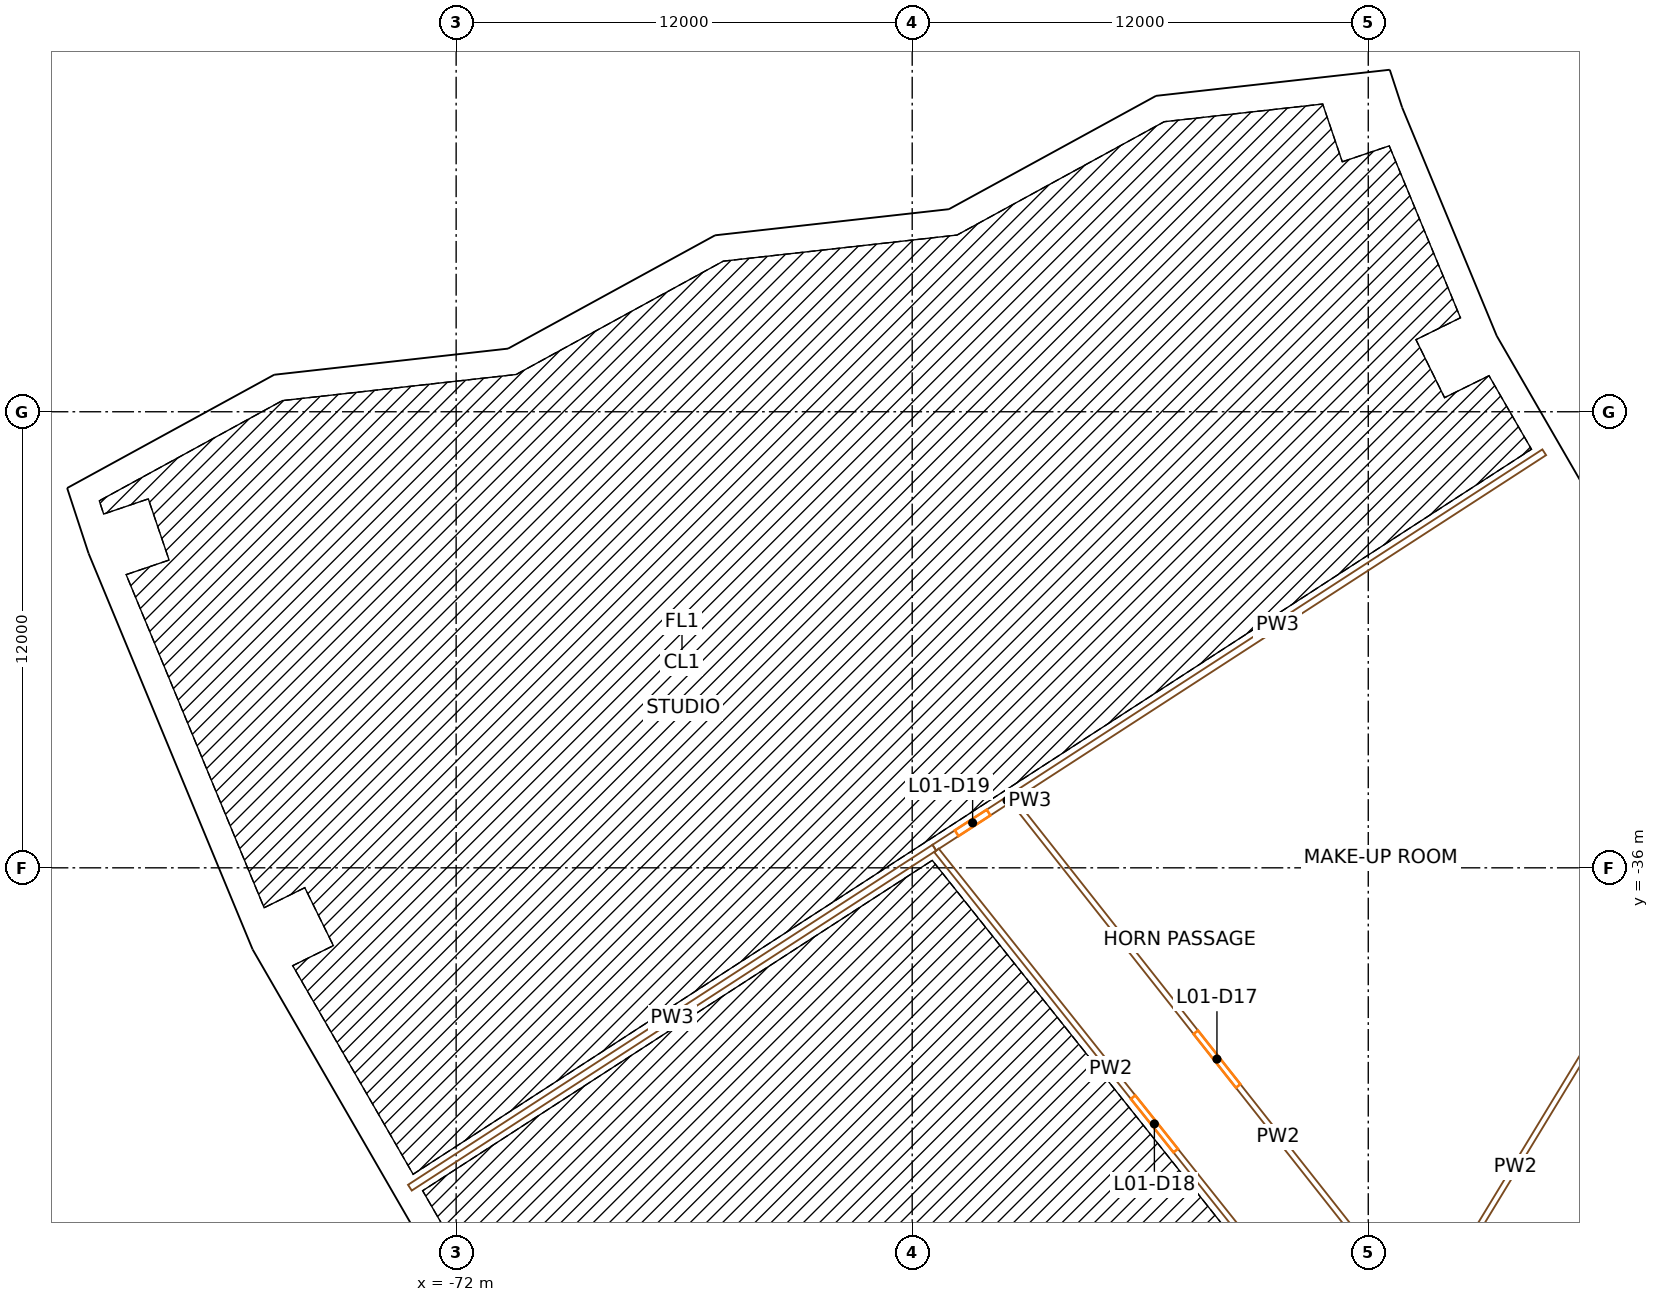
"""IFC4 building model, lengths in metres.
Left out: names, types, materials, properties, quantities, classifications, styles, units other than length and angle.
Written with IfcOpenShell. Run it as: python <this file> out.ifc"""

import sys

from ifc_helpers import new_model, si_unit, direction, frame, frame_2d, origin, origin_2d, place, context, subcontext, project, spatial, rectangle, extrude, element, fill, save


model = new_model("IFC4")
c1 = context("Model", 3, precision=1e-05, world=origin(), true_north=direction((0.0, 1.0)))
c2 = subcontext(c1, "Body", "Model", "MODEL_VIEW")
j1 = project(units=[si_unit("LENGTHUNIT", "METRE"), si_unit("PLANEANGLEUNIT", "RADIAN")], contexts=[c1])
p1 = place(None, origin())
s1 = spatial("IfcSite", under=j1, at=p1, CompositionType="ELEMENT")
p2 = place(p1, origin())
s2 = spatial("IfcBuilding", under=s1, at=p2, CompositionType="ELEMENT")
p3 = place(p2, frame((0.0, 0.0, 9.0)))
s3 = spatial("IfcBuildingStorey", under=s2, at=p3, CompositionType="ELEMENT", Elevation=9.0)
p4 = place(p3, frame((-48.057, -16.313, 0.0), z_axis=(0.0, 0.0, 1.0), x_axis=(0.321439465303, -0.946930129495, 0.0)))
e1 = element("IfcColumn", 1, at=p4, inside=s3, PredefinedType="COLUMN", context=c2, shape_type="SweptSolid", body=[
    extrude(rectangle(XDim=1.1, YDim=1.3, at=origin_2d()), origin(), (0.0, 0.0, 1.0), 9.0),
])
for number, where, z_axis, x_axis in (
    (2, (-55.159, -18.724, 0.0), (0.0, 0.0, 1.0), (0.321, -0.947, 0.0)),
    (3, (-73.624, -24.992, 0.0), (0.0, 0.0, 1.0), (0.321, -0.947, 0.0)),
):
    element("IfcColumn", number, at=place(p3, frame(where, z_axis=z_axis, x_axis=x_axis)), inside=s3, PredefinedType="COLUMN", context=c2, shape_type="SweptSolid", body=[
        extrude(rectangle(XDim=1.4, YDim=1.8, at=origin_2d()), origin(), (0.0, 0.0, 1.0), 9.0),
    ])
for number, where, z_axis, x_axis in (
    (4, (-80.726, -27.403, 0.0), (0.0, 0.0, 1.0), (0.321, -0.947, 0.0)),
    (5, (-45.516, -22.446, 0.0), (0.0, 0.0, 1.0), (0.442, -0.897, 0.0)),
):
    element("IfcColumn", number, at=place(p3, frame(where, z_axis=z_axis, x_axis=x_axis)), inside=s3, PredefinedType="COLUMN", context=c2, shape_type="SweptSolid", body=[
        extrude(rectangle(XDim=1.1, YDim=1.3, at=origin_2d()), origin(), (0.0, 0.0, 1.0), 9.0),
    ])
for number, where, z_axis, x_axis in (
    (6, (-52.243, -25.763, 0.0), (0.0, 0.0, 1.0), (0.442, -0.897, 0.0)),
    (7, (-69.732, -34.388, 0.0), (0.0, 0.0, 1.0), (0.442, -0.897, 0.0)),
):
    element("IfcColumn", number, at=place(p3, frame(where, z_axis=z_axis, x_axis=x_axis)), inside=s3, PredefinedType="COLUMN", context=c2, shape_type="SweptSolid", body=[
        extrude(rectangle(XDim=1.4, YDim=1.8, at=origin_2d()), origin(), (0.0, 0.0, 1.0), 9.0),
    ])
for number, where, z_axis, x_axis in (
    (8, (-76.458, -37.705, 0.0), (0.0, 0.0, 1.0), (0.442, -0.897, 0.0)),
    (9, (-42.197, -28.195, 0.0), (0.0, 0.0, 1.0), (0.556, -0.831, 0.0)),
):
    element("IfcColumn", number, at=place(p3, frame(where, z_axis=z_axis, x_axis=x_axis)), inside=s3, PredefinedType="COLUMN", context=c2, shape_type="SweptSolid", body=[
        extrude(rectangle(XDim=1.1, YDim=1.3, at=origin_2d()), origin(), (0.0, 0.0, 1.0), 9.0),
    ])
for number, where, z_axis, x_axis in (
    (10, (-48.433, -32.362, 0.0), (0.0, 0.0, 1.0), (0.556, -0.831, 0.0)),
    (11, (-64.647, -43.196, 0.0), (0.0, 0.0, 1.0), (0.556, -0.831, 0.0)),
    (12, (-43.795, -38.407, 0.0), (0.0, 0.0, 1.0), (0.659, -0.752, 0.0)),
):
    element("IfcColumn", number, at=place(p3, frame(where, z_axis=z_axis, x_axis=x_axis)), inside=s3, PredefinedType="COLUMN", context=c2, shape_type="SweptSolid", body=[
        extrude(rectangle(XDim=1.4, YDim=1.8, at=origin_2d()), origin(), (0.0, 0.0, 1.0), 9.0),
    ])
p5 = place(p3, frame((-49.779, -57.191, 0.0), z_axis=(0.0, 0.0, 1.0), x_axis=(0.573577477574, 0.819151315216, 0.0)))
e13 = element("IfcWall", 13, at=p5, inside=s3, PredefinedType="SHEAR", context=c2, shape_type="SweptSolid", body=[
    extrude(rectangle(XDim=14.8, YDim=0.9, at=frame_2d((7.4, 0.0))), origin(), (0.0, 0.0, 1.0), 8.6),
])
p6 = place(p5, frame((6.7, 0.0, 0.0)))
e14 = element("IfcOpeningElement", 14, at=p6, cuts=e13, PredefinedType="OPENING", context=c2, shape_type="SweptSolid", body=[
    extrude(rectangle(XDim=1.4, YDim=2.1, at=frame_2d((0.7, 1.05))), frame((0.0, 0.46, 0.0), z_axis=(0.0, -1.0, 0.0), x_axis=(1.0, 0.0, 0.0)), (0.0, 0.0, 1.0), 0.92),
])
p7 = place(p3, frame((-47.373, -15.221, 0.0), z_axis=(0.0, 0.0, 1.0), x_axis=(-0.993827533543, -0.110936168908, 0.0)))
e15 = element("IfcWall", 15, at=p7, inside=s3, PredefinedType="SOLIDWALL", context=c2, shape_type="SweptSolid", body=[
    extrude(rectangle(XDim=6.265, YDim=0.45, at=frame_2d((3.133, 0.0))), origin(), (0.0, 0.0, 1.0), 7.7),
])
p8 = place(p3, frame((-53.659, -15.985, 0.0), z_axis=(0.0, 0.0, 1.0), x_axis=(-0.87728135657, -0.479976480064, 0.0)))
e16 = element("IfcWall", 16, at=p8, inside=s3, PredefinedType="SOLIDWALL", context=c2, shape_type="SweptSolid", body=[
    extrude(rectangle(XDim=5.885, YDim=0.45, at=frame_2d((2.943, 0.0))), origin(), (0.0, 0.0, 1.0), 7.7),
])
p9 = place(p3, frame((-58.881, -18.879, 0.0), z_axis=(0.0, 0.0, 1.0), x_axis=(-0.993818963433, -0.111012917816, 0.0)))
e17 = element("IfcWall", 17, at=p9, inside=s3, PredefinedType="SOLIDWALL", context=c2, shape_type="SweptSolid", body=[
    extrude(rectangle(XDim=6.36, YDim=0.45, at=frame_2d((3.18, 0.0))), origin(), (0.0, 0.0, 1.0), 7.7),
])
p10 = place(p3, frame((-65.261, -19.655, 0.0), z_axis=(0.0, 0.0, 1.0), x_axis=(-0.877230259454, -0.480069861477, 0.0)))
e18 = element("IfcWall", 18, at=p10, inside=s3, PredefinedType="SOLIDWALL", context=c2, shape_type="SweptSolid", body=[
    extrude(rectangle(XDim=5.884, YDim=0.45, at=frame_2d((2.942, 0.0))), origin(), (0.0, 0.0, 1.0), 7.7),
])
p11 = place(p3, frame((-70.481, -22.548, 0.0), z_axis=(0.0, 0.0, 1.0), x_axis=(-0.993813805196, -0.111059086081, 0.0)))
e19 = element("IfcWall", 19, at=p11, inside=s3, PredefinedType="SOLIDWALL", context=c2, shape_type="SweptSolid", body=[
    extrude(rectangle(XDim=6.362, YDim=0.45, at=frame_2d((3.181, 0.0))), origin(), (0.0, 0.0, 1.0), 7.7),
])
p12 = place(p3, frame((-76.863, -23.324, 0.0), z_axis=(0.0, 0.0, 1.0), x_axis=(-0.877209140108, -0.480108450781, 0.0)))
e20 = element("IfcWall", 20, at=p12, inside=s3, PredefinedType="SOLIDWALL", context=c2, shape_type="SweptSolid", body=[
    extrude(rectangle(XDim=5.553, YDim=0.45, at=frame_2d((2.776, 0.0))), origin(), (0.0, 0.0, 1.0), 7.7),
])
p13 = place(p3, frame((-47.331, -16.04, 0.0), z_axis=(0.0, 0.0, 1.0), x_axis=(-0.311474670585, 0.950254455177, 0.0)))
e21 = element("IfcWall", 21, at=p13, inside=s3, PredefinedType="SOLIDWALL", context=c2, shape_type="SweptSolid", body=[
    extrude(rectangle(XDim=0.571, YDim=0.45, at=frame_2d((0.285, 0.0))), origin(), (0.0, 0.0, 1.0), 7.7),
])
p14 = place(p3, frame((-44.81, -22.131, 0.0), z_axis=(0.0, 0.0, 1.0), x_axis=(-0.382692796414, 0.92387565374, 0.0)))
e22 = element("IfcWall", 22, at=p14, inside=s3, PredefinedType="SOLIDWALL", context=c2, shape_type="SweptSolid", body=[
    extrude(rectangle(XDim=6.576, YDim=0.45, at=frame_2d((3.288, 0.0))), origin(), (0.0, 0.0, 1.0), 7.7),
])
p15 = place(p3, frame((-41.583, -27.714, 0.0), z_axis=(0.0, 0.0, 1.0), x_axis=(-0.50000447882, 0.866022817921, 0.0)))
e23 = element("IfcWall", 23, at=p15, inside=s3, PredefinedType="SOLIDWALL", context=c2, shape_type="SweptSolid", body=[
    extrude(rectangle(XDim=6.419, YDim=0.45, at=frame_2d((3.21, 0.0))), origin(), (0.0, 0.0, 1.0), 7.7),
])
p16 = place(p3, frame((-82.032, -25.906, 0.0), z_axis=(0.0, 0.0, 1.0), x_axis=(0.311608566113, -0.950210556416, 0.0)))
e24 = element("IfcWall", 24, at=p16, inside=s3, PredefinedType="SOLIDWALL", context=c2, shape_type="SweptSolid", body=[
    extrude(rectangle(XDim=0.936, YDim=0.45, at=frame_2d((0.468, 0.0))), origin(), (0.0, 0.0, 1.0), 7.7),
])
p17 = place(p3, frame((-81.74, -26.796, 0.0), z_axis=(0.0, 0.0, 1.0), x_axis=(0.311634105085, -0.950202180879, 0.0)))
e25 = element("IfcWall", 25, at=p17, inside=s3, PredefinedType="SOLIDWALL", context=c2, shape_type="SweptSolid", body=[
    extrude(rectangle(XDim=0.91, YDim=0.45, at=frame_2d((0.455, 0.0))), origin(), (0.0, 0.0, 1.0), 7.7),
])
p18 = place(p3, frame((-81.449, -27.676, 0.0), z_axis=(0.0, 0.0, 1.0), x_axis=(0.382700611107, -0.923872416656, 0.0)))
e26 = element("IfcWall", 26, at=p18, inside=s3, PredefinedType="SOLIDWALL", context=c2, shape_type="SweptSolid", body=[
    extrude(rectangle(XDim=11.168, YDim=0.45, at=frame_2d((5.584, 0.0))), origin(), (0.0, 0.0, 1.0), 7.7),
])
p19 = place(p3, frame((-77.168, -38.022, 0.0), z_axis=(0.0, 0.0, 1.0), x_axis=(0.500001430823, -0.866024577697, 0.0)))
e27 = element("IfcWall", 27, at=p19, inside=s3, PredefinedType="SOLIDWALL", context=c2, shape_type="SweptSolid", body=[
    extrude(rectangle(XDim=11.312, YDim=0.45, at=frame_2d((5.656, 0.0))), origin(), (0.0, 0.0, 1.0), 7.7),
])
p20 = place(p3, frame((-73.217, -44.416, 0.0), z_axis=(0.0, 0.0, 1.0), x_axis=(0.839098650594, 0.543979277703, 0.0)))
e28 = element("IfcWall", 28, at=p20, inside=s3, PredefinedType="PARTITIONING", context=c2, shape_type="SweptSolid", body=[
    extrude(rectangle(XDim=16.445, YDim=0.18, at=frame_2d((8.223, 0.0))), origin(), (0.0, 0.0, 1.0), 7.6),
])
p21 = place(p3, frame((-59.418, -35.47, 0.0), z_axis=(0.0, 0.0, 1.0), x_axis=(0.839081673018, 0.544005465051, 0.0)))
e29 = element("IfcWall", 29, at=p21, inside=s3, PredefinedType="PARTITIONING", context=c2, shape_type="SweptSolid", body=[
    extrude(rectangle(XDim=2.402, YDim=0.18, at=frame_2d((1.201, 0.0))), origin(), (0.0, 0.0, 1.0), 7.6),
])
p22 = place(p21, frame((0.701, 0.0, 0.0)))
e30 = element("IfcOpeningElement", 30, at=p22, cuts=e29, PredefinedType="OPENING", context=c2, shape_type="SweptSolid", body=[
    extrude(rectangle(XDim=1.0, YDim=2.1, at=frame_2d((0.5, 1.05))), frame((0.0, 0.1, 0.0), z_axis=(0.0, -1.0, 0.0), x_axis=(1.0, 0.0, 0.0)), (0.0, 0.0, 1.0), 0.2),
])
p23 = place(p3, frame((-57.403, -34.164, 0.0), z_axis=(0.0, 0.0, 1.0), x_axis=(0.83909708633, 0.543981690604, 0.0)))
e31 = element("IfcWall", 31, at=p23, inside=s3, PredefinedType="PARTITIONING", context=c2, shape_type="SweptSolid", body=[
    extrude(rectangle(XDim=16.723, YDim=0.18, at=frame_2d((8.362, 0.0))), origin(), (0.0, 0.0, 1.0), 7.6),
])
p24 = place(p3, frame((-47.893, -49.935, 0.0), z_axis=(0.0, 0.0, 1.0), x_axis=(-0.623145641882, 0.782105817011, 0.0)))
e32 = element("IfcWall", 32, at=p24, inside=s3, PredefinedType="PARTITIONING", context=c2, shape_type="SweptSolid", body=[
    extrude(rectangle(XDim=18.404, YDim=0.15, at=frame_2d((9.202, 0.0))), origin(), (0.0, 0.0, 1.0), 7.6),
])
p25 = place(p24, frame((8.302, 0.0, 0.0)))
e33 = element("IfcOpeningElement", 33, at=p25, cuts=e32, PredefinedType="OPENING", context=c2, shape_type="SweptSolid", body=[
    extrude(rectangle(XDim=1.8, YDim=2.1, at=frame_2d((0.9, 1.05))), frame((0.0, 0.085, 0.0), z_axis=(0.0, -1.0, 0.0), x_axis=(1.0, 0.0, 0.0)), (0.0, 0.0, 1.0), 0.17),
])
p26 = place(p3, frame((-57.347, -34.235, 0.0), z_axis=(0.0, 0.0, 1.0), x_axis=(0.619516324984, -0.784983772494, 0.0)))
e34 = element("IfcWall", 34, at=p26, inside=s3, PredefinedType="PARTITIONING", context=c2, shape_type="SweptSolid", body=[
    extrude(rectangle(XDim=17.322, YDim=0.15, at=frame_2d((8.661, 0.0))), origin(), (0.0, 0.0, 1.0), 7.6),
])
p27 = place(p26, frame((7.761, 0.0, 0.0)))
e35 = element("IfcOpeningElement", 35, at=p27, cuts=e34, PredefinedType="OPENING", context=c2, shape_type="SweptSolid", body=[
    extrude(rectangle(XDim=1.8, YDim=2.1, at=frame_2d((0.9, 1.05))), frame((0.0, 0.085, 0.0), z_axis=(0.0, -1.0, 0.0), x_axis=(1.0, 0.0, 0.0)), (0.0, 0.0, 1.0), 0.17),
])
p28 = place(p3, frame((-41.648, -39.789, 0.0), z_axis=(0.0, 0.0, 1.0), x_axis=(-0.519144162426, -0.854686690325, 0.0)))
e36 = element("IfcWall", 36, at=p28, inside=s3, PredefinedType="PARTITIONING", context=c2, shape_type="SweptSolid", body=[
    extrude(rectangle(XDim=9.554, YDim=0.15, at=frame_2d((4.777, 0.0))), origin(), (0.0, 0.0, 1.0), 7.6),
])
p29 = place(p27, origin())
e37 = element("IfcDoor", 37, at=p29, inside=s3, OperationType="DOUBLE_DOOR_SINGLE_SWING", PredefinedType="DOOR", context=c2, shape_type="SweptSolid", body=[
    extrude(rectangle(XDim=1.8, YDim=2.1, at=frame_2d((0.9, 1.05))), frame((0.0, 0.025, 0.0), z_axis=(0.0, -1.0, 0.0), x_axis=(1.0, 0.0, 0.0)), (0.0, 0.0, 1.0), 0.05),
])
fill(e35, e37)
p30 = place(p25, origin())
e38 = element("IfcDoor", 38, at=p30, inside=s3, OperationType="DOUBLE_DOOR_SINGLE_SWING", PredefinedType="DOOR", context=c2, shape_type="SweptSolid", body=[
    extrude(rectangle(XDim=1.8, YDim=2.1, at=frame_2d((0.9, 1.05))), frame((0.0, 0.025, 0.0), z_axis=(0.0, -1.0, 0.0), x_axis=(1.0, 0.0, 0.0)), (0.0, 0.0, 1.0), 0.05),
])
fill(e33, e38)
p31 = place(p22, origin())
e39 = element("IfcDoor", 39, at=p31, inside=s3, OperationType="SINGLE_SWING_RIGHT", PredefinedType="DOOR", context=c2, shape_type="SweptSolid", body=[
    extrude(rectangle(XDim=1.0, YDim=2.1, at=frame_2d((0.5, 1.05))), frame((0.0, 0.025, 0.0), z_axis=(0.0, -1.0, 0.0), x_axis=(1.0, 0.0, 0.0)), (0.0, 0.0, 1.0), 0.05),
])
fill(e30, e39)
save(model, sys.argv[1])
